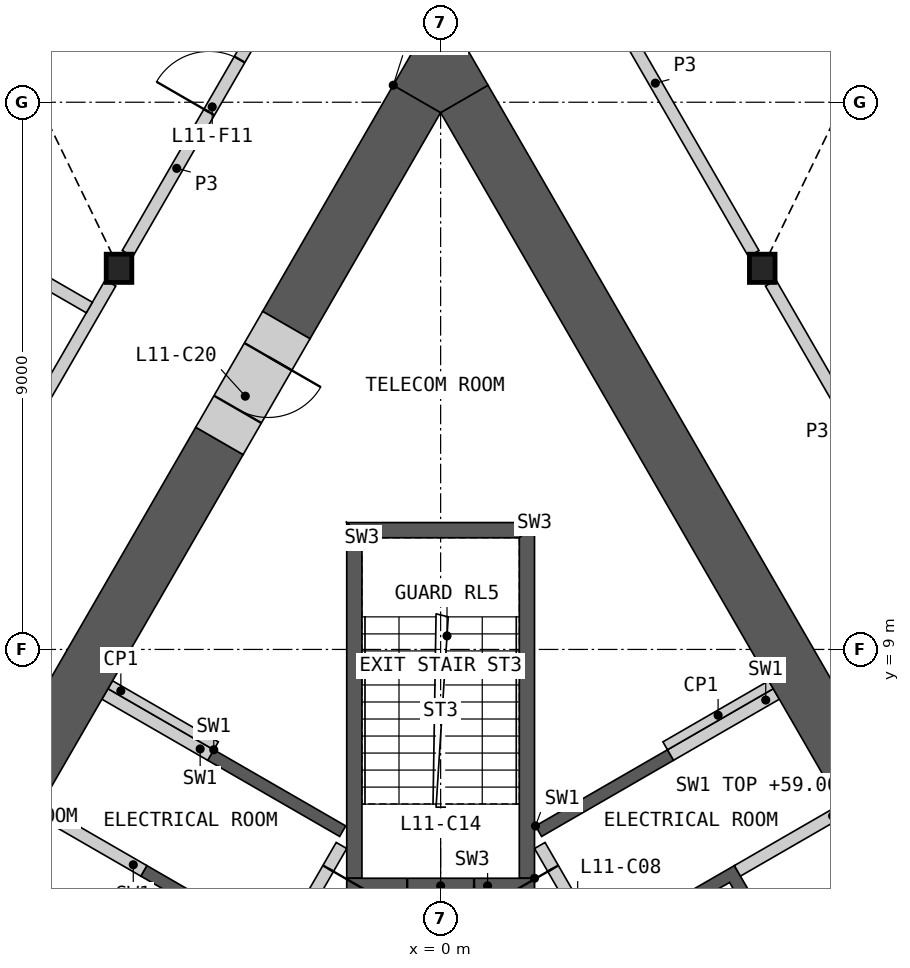
"""IFC4 building model, lengths in metres.
Left out: names, types, materials, properties, quantities, classifications, styles, units other than length and angle.
Written with IfcOpenShell. Run it as: python <this file> out.ifc"""

import sys

from ifc_helpers import new_model, si_unit, direction, frame, frame_2d, origin, origin_2d, place, context, subcontext, project, spatial, polyline, rectangle, i_section, outline, extrude, element, fill, save


model = new_model("IFC4")
c1 = context("Model", 3, precision=1e-05, world=origin(), true_north=direction((0.0, 1.0)))
c2 = subcontext(c1, "Body", "Model", "MODEL_VIEW")
j1 = project(units=[si_unit("LENGTHUNIT", "METRE"), si_unit("PLANEANGLEUNIT", "RADIAN")], contexts=[c1])
p1 = place(None, origin())
s1 = spatial("IfcSite", under=j1, at=p1, CompositionType="ELEMENT")
p2 = place(p1, origin())
s2 = spatial("IfcBuilding", under=s1, at=p2, CompositionType="ELEMENT")
p3 = place(p2, frame((0.0, 0.0, 55.2)))
s3 = spatial("IfcBuildingStorey", under=s2, at=p3, CompositionType="ELEMENT", Elevation=55.2)
for number, where, z_axis, x_axis in (
    (1, (-5.289, 15.269, 0.0), (0.0, 0.0, 1.0), (1.0, 0.0, 0.0)),
    (2, (5.289, 15.269, 0.0), (0.0, 0.0, 1.0), (1.0, 0.0, 0.0)),
):
    element("IfcColumn", number, at=place(p3, frame(where, z_axis=z_axis, x_axis=x_axis)), inside=s3, PredefinedType="COLUMN", context=c2, shape_type="SweptSolid", body=[
        extrude(i_section(OverallWidth=0.421, OverallDepth=0.465, WebThickness=0.045, FlangeThickness=0.072, at=origin_2d()), origin(), (0.0, 0.0, 1.0), 4.2),
    ])
p4 = place(p3, origin())
e3 = element("IfcWall", 3, at=p4, inside=s3, PredefinedType="SHEAR", context=c2, shape_type="SweptSolid", body=[
    extrude(outline(polyline([(1.561, 6.097), (3.731, 7.35), (3.831, 7.177), (1.66, 5.924), (1.561, 6.097)])), origin(), (0.0, 0.0, 1.0), 3.8),
])
p5 = place(p3, origin())
e4 = element("IfcWall", 4, at=p5, inside=s3, PredefinedType="SHEAR", context=c2, shape_type="SweptSolid", body=[
    extrude(outline(polyline([(2.66, 4.192), (4.831, 5.445), (8.231, -0.444), (6.061, -1.697), (5.96, -1.524), (7.952, -0.374), (6.952, 1.358), (4.96, 0.208), (4.861, 0.381), (6.852, 1.531), (5.852, 3.263), (3.861, 2.113), (3.76, 2.287), (5.752, 3.437), (4.752, 5.169), (2.76, 4.019), (2.66, 4.192)])), origin(), (0.0, 0.0, 1.0), 3.8),
])
p6 = place(p3, frame((5.817, -1.476, 0.0), z_axis=(0.0, 0.0, 1.0), x_axis=(-0.500002616675, 0.866023893041, 0.0)))
e5 = element("IfcWall", 5, at=p6, inside=s3, PredefinedType="SOLIDWALL", context=c2, shape_type="SweptSolid", body=[
    extrude(rectangle(XDim=8.373, YDim=0.2, at=frame_2d((4.187, 0.0))), origin(), (0.0, 0.0, 1.0), 3.8),
])
p7 = place(p6, frame((0.337, 0.0, 0.0)))
e6 = element("IfcOpeningElement", 6, at=p7, cuts=e5, PredefinedType="OPENING", context=c2, shape_type="SweptSolid", body=[
    extrude(rectangle(XDim=1.1, YDim=2.1, at=frame_2d((0.55, 1.05))), frame((0.0, 0.11, 0.0), z_axis=(0.0, -1.0, 0.0), x_axis=(1.0, 0.0, 0.0)), (0.0, 0.0, 1.0), 0.22),
])
p8 = place(p6, frame((2.537, 0.0, 0.0)))
e7 = element("IfcOpeningElement", 7, at=p8, cuts=e5, PredefinedType="OPENING", context=c2, shape_type="SweptSolid", body=[
    extrude(rectangle(XDim=1.1, YDim=2.1, at=frame_2d((0.55, 1.05))), frame((0.0, 0.11, 0.0), z_axis=(0.0, -1.0, 0.0), x_axis=(1.0, 0.0, 0.0)), (0.0, 0.0, 1.0), 0.22),
])
p9 = place(p6, frame((4.737, 0.0, 0.0)))
e8 = element("IfcOpeningElement", 8, at=p9, cuts=e5, PredefinedType="OPENING", context=c2, shape_type="SweptSolid", body=[
    extrude(rectangle(XDim=1.1, YDim=2.1, at=frame_2d((0.55, 1.05))), frame((0.0, 0.11, 0.0), z_axis=(0.0, -1.0, 0.0), x_axis=(1.0, 0.0, 0.0)), (0.0, 0.0, 1.0), 0.22),
])
p10 = place(p6, frame((7.037, 0.0, 0.0)))
e9 = element("IfcOpeningElement", 9, at=p10, cuts=e5, PredefinedType="OPENING", context=c2, shape_type="SweptSolid", body=[
    extrude(rectangle(XDim=0.9, YDim=2.1, at=frame_2d((0.45, 1.05))), frame((0.0, 0.11, 0.0), z_axis=(0.0, -1.0, 0.0), x_axis=(1.0, 0.0, 0.0)), (0.0, 0.0, 1.0), 0.22),
])
p11 = place(p3, frame((4.881, 5.358, 0.0), z_axis=(0.0, 0.0, 1.0), x_axis=(0.866035824272, 0.499981950752, 0.0)))
e10 = element("IfcWall", 10, at=p11, inside=s3, PredefinedType="SHEAR", context=c2, shape_type="SweptSolid", body=[
    extrude(rectangle(XDim=2.009, YDim=0.2, at=frame_2d((1.004, 0.0))), origin(), (0.0, 0.0, 1.0), 3.8),
])
p12 = place(p3, frame((3.781, 7.263, 0.0), z_axis=(0.0, 0.0, 1.0), x_axis=(0.865983199114, 0.50007309351, 0.0)))
e11 = element("IfcWall", 11, at=p12, inside=s3, PredefinedType="SHEAR", context=c2, shape_type="SweptSolid", body=[
    extrude(rectangle(XDim=2.009, YDim=0.2, at=frame_2d((1.004, 0.0))), origin(), (0.0, 0.0, 1.0), 3.8),
])
p13 = place(p3, origin())
e12 = element("IfcWall", 12, at=p13, inside=s3, PredefinedType="SHEAR", context=c2, shape_type="SweptSolid", body=[
    extrude(outline(polyline([(-2.76, 4.019), (-4.931, 5.272), (-4.831, 5.445), (-2.66, 4.192), (-2.76, 4.019)])), origin(), (0.0, 0.0, 1.0), 3.8),
])
p14 = place(p3, origin())
e13 = element("IfcWall", 13, at=p14, inside=s3, PredefinedType="SHEAR", context=c2, shape_type="SweptSolid", body=[
    extrude(outline(polyline([(-3.731, 7.35), (-1.561, 6.097), (-1.66, 5.924), (-3.831, 7.177), (-3.731, 7.35)])), origin(), (0.0, 0.0, 1.0), 3.8),
])
p15 = place(p3, frame((-1.631, 5.776, 0.0), z_axis=(0.0, 0.0, 1.0), x_axis=(-0.499992876559, -0.866029516466, 0.0)))
e14 = element("IfcWall", 14, at=p15, inside=s3, PredefinedType="SOLIDWALL", context=c2, shape_type="SweptSolid", body=[
    extrude(rectangle(XDim=6.486, YDim=0.2, at=frame_2d((3.243, 0.0))), origin(), (0.0, 0.0, 1.0), 3.8),
])
p16 = place(p15, frame((0.437, 0.0, 0.0)))
e15 = element("IfcOpeningElement", 15, at=p16, cuts=e14, PredefinedType="OPENING", context=c2, shape_type="SweptSolid", body=[
    extrude(rectangle(XDim=0.9, YDim=2.1, at=frame_2d((0.45, 1.05))), frame((0.0, 0.11, 0.0), z_axis=(0.0, -1.0, 0.0), x_axis=(1.0, 0.0, 0.0)), (0.0, 0.0, 1.0), 0.22),
])
p17 = place(p15, frame((2.637, 0.0, 0.0)))
e16 = element("IfcOpeningElement", 16, at=p17, cuts=e14, PredefinedType="OPENING", context=c2, shape_type="SweptSolid", body=[
    extrude(rectangle(XDim=0.9, YDim=2.1, at=frame_2d((0.45, 1.05))), frame((0.0, 0.11, 0.0), z_axis=(0.0, -1.0, 0.0), x_axis=(1.0, 0.0, 0.0)), (0.0, 0.0, 1.0), 0.22),
])
p18 = place(p3, frame((-3.781, 7.263, 0.0), z_axis=(0.0, 0.0, 1.0), x_axis=(-0.865983199114, 0.50007309351, 0.0)))
e17 = element("IfcWall", 17, at=p18, inside=s3, PredefinedType="SHEAR", context=c2, shape_type="SweptSolid", body=[
    extrude(rectangle(XDim=2.009, YDim=0.2, at=frame_2d((1.004, 0.0))), origin(), (0.0, 0.0, 1.0), 3.8),
])
p19 = place(p3, frame((-4.881, 5.358, 0.0), z_axis=(0.0, 0.0, 1.0), x_axis=(-0.866035824272, 0.499981950752, 0.0)))
e18 = element("IfcWall", 18, at=p19, inside=s3, PredefinedType="SHEAR", context=c2, shape_type="SweptSolid", body=[
    extrude(rectangle(XDim=2.009, YDim=0.2, at=frame_2d((1.004, 0.0))), origin(), (0.0, 0.0, 1.0), 3.8),
])
p20 = place(p3, origin())
e19 = element("IfcWall", 19, at=p20, inside=s3, PredefinedType="SHEAR", context=c2, shape_type="SweptSolid", body=[
    extrude(outline(polyline([(1.544, 5.237), (1.544, 11.087), (1.294, 10.837), (1.294, 5.237), (1.544, 5.237)])), origin(), (0.0, 0.0, 1.0), 3.8),
])
p21 = place(p3, origin())
e20 = element("IfcWall", 20, at=p21, inside=s3, PredefinedType="SHEAR", context=c2, shape_type="SweptSolid", body=[
    extrude(outline(polyline([(1.544, 11.087), (-1.544, 11.087), (-1.294, 10.837), (1.294, 10.837), (1.544, 11.087)])), origin(), (0.0, 0.0, 1.0), 3.8),
])
p22 = place(p3, origin())
e21 = element("IfcWall", 21, at=p22, inside=s3, PredefinedType="SHEAR", context=c2, shape_type="SweptSolid", body=[
    extrude(outline(polyline([(-1.294, 10.837), (-1.544, 11.087), (-1.544, 5.237), (-1.294, 5.237), (-1.294, 10.837)])), origin(), (0.0, 0.0, 1.0), 3.8),
])
p23 = place(p3, frame((1.544, 5.112, 0.0), z_axis=(0.0, 0.0, 1.0), x_axis=(-1.0, 0.0, 0.0)))
e22 = element("IfcWall", 22, at=p23, inside=s3, PredefinedType="SHEAR", context=c2, shape_type="SweptSolid", body=[
    extrude(rectangle(XDim=3.088, YDim=0.25, at=frame_2d((1.544, 0.0))), origin(), (0.0, 0.0, 1.0), 3.8),
])
p24 = place(p23, frame((0.994, 0.0, 0.0)))
e23 = element("IfcOpeningElement", 23, at=p24, cuts=e22, PredefinedType="OPENING", context=c2, shape_type="SweptSolid", body=[
    extrude(rectangle(XDim=1.1, YDim=2.1, at=frame_2d((0.55, 1.05))), frame((0.0, 0.135, 0.0), z_axis=(0.0, -1.0, 0.0), x_axis=(1.0, 0.0, 0.0)), (0.0, 0.0, 1.0), 0.27),
])
for number, where, z_axis, x_axis in (
    (24, (3.693, 7.415, 0.0), (0.0, 0.0, 1.0), (0.866, 0.5, 0.0)),
    (25, (-3.693, 7.415, 0.0), (0.0, 0.0, 1.0), (-0.866, 0.5, 0.0)),
):
    element("IfcWall", number, at=place(p3, frame(where, z_axis=z_axis, x_axis=x_axis)), inside=s3, PredefinedType="PARTITIONING", context=c2, shape_type="SweptSolid", body=[
        extrude(rectangle(XDim=2.009, YDim=0.15, at=frame_2d((1.004, 0.0))), origin(), (0.0, 0.0, 1.0), 3.8),
    ])
p25 = place(p3, frame((8.16, 4.596, 0.0), z_axis=(0.0, 0.0, 1.0), x_axis=(-0.500009830349, 0.866019728156, 0.0)))
e26 = element("IfcWall", 26, at=p25, inside=s3, PredefinedType="SHEAR", context=c2, shape_type="SweptSolid", body=[
    extrude(rectangle(XDim=15.541, YDim=0.9, at=frame_2d((7.771, 0.0))), origin(), (0.0, 0.0, 1.0), 3.8),
])
p26 = place(p3, frame((-3.637, 12.43, 0.0), z_axis=(0.0, 0.0, 1.0), x_axis=(-0.500011513458, -0.866018756384, 0.0)))
e27 = element("IfcWall", 27, at=p26, inside=s3, PredefinedType="SHEAR", context=c2, shape_type="SweptSolid", body=[
    extrude(rectangle(XDim=9.066, YDim=0.9, at=frame_2d((4.533, 0.0))), origin(), (0.0, 0.0, 1.0), 3.8),
])
p27 = place(p3, frame((-0.39, 18.055, 0.0), z_axis=(0.0, 0.0, 1.0), x_axis=(-0.500014347272, -0.866017120224, 0.0)))
e28 = element("IfcWall", 28, at=p27, inside=s3, PredefinedType="SHEAR", context=c2, shape_type="SweptSolid", body=[
    extrude(rectangle(XDim=4.296, YDim=0.9, at=frame_2d((2.148, 0.0))), origin(), (0.0, 0.0, 1.0), 3.8),
])
p28 = place(p3, origin())
e29 = element("IfcWall", 29, at=p28, inside=s3, PredefinedType="SHEAR", context=c2, shape_type="SweptSolid", body=[
    extrude(outline(polyline([(-0.779, 18.28), (0.0, 19.63), (0.779, 18.28), (0.0, 17.83), (-0.779, 18.28)])), origin(), (0.0, 0.0, 1.0), 3.8),
])
p29 = place(p3, frame((-2.538, 14.335, 0.0), z_axis=(0.0, 0.0, 1.0), x_axis=(-0.499994660107, -0.866028486751, 0.0)))
e30 = element("IfcWall", 30, at=p29, inside=s3, PredefinedType="SHEAR", context=c2, shape_type="SweptSolid", body=[
    extrude(rectangle(XDim=2.2, YDim=0.9, at=frame_2d((1.1, 0.0))), origin(), (0.0, 0.0, 1.0), 3.8),
])
p30 = place(p29, frame((0.6, 0.0, 0.0)))
e31 = element("IfcOpeningElement", 31, at=p30, cuts=e30, PredefinedType="OPENING", context=c2, shape_type="SweptSolid", body=[
    extrude(rectangle(XDim=1.0, YDim=2.1, at=frame_2d((0.5, 1.05))), frame((0.0, 0.46, 0.0), z_axis=(0.0, -1.0, 0.0), x_axis=(1.0, 0.0, 0.0)), (0.0, 0.0, 1.0), 0.92),
])
p31 = place(p3, frame((5.429, 15.026, 0.0), z_axis=(0.0, 0.0, 1.0), x_axis=(0.50001002959, -0.86601961312, 0.0)))
e32 = element("IfcWall", 32, at=p31, inside=s3, PredefinedType="PARTITIONING", context=c2, shape_type="SweptSolid", body=[
    extrude(rectangle(XDim=10.019, YDim=0.2, at=frame_2d((5.009, 0.0))), origin(), (0.0, 0.0, 1.0), 3.8),
])
p32 = place(p31, frame((4.059, 0.0, 0.0)))
e33 = element("IfcOpeningElement", 33, at=p32, cuts=e32, PredefinedType="OPENING", context=c2, shape_type="SweptSolid", body=[
    extrude(rectangle(XDim=1.8, YDim=2.1, at=frame_2d((0.9, 1.05))), frame((0.0, 0.11, 0.0), z_axis=(0.0, -1.0, 0.0), x_axis=(1.0, 0.0, 0.0)), (0.0, 0.0, 1.0), 0.22),
])
p33 = place(p3, frame((-10.439, 6.35, 0.0), z_axis=(0.0, 0.0, 1.0), x_axis=(0.50001002959, 0.86601961312, 0.0)))
e34 = element("IfcWall", 34, at=p33, inside=s3, PredefinedType="PARTITIONING", context=c2, shape_type="SweptSolid", body=[
    extrude(rectangle(XDim=10.019, YDim=0.2, at=frame_2d((5.009, 0.0))), origin(), (0.0, 0.0, 1.0), 3.8),
])
p34 = place(p33, frame((4.259, 0.0, 0.0)))
e35 = element("IfcOpeningElement", 35, at=p34, cuts=e34, PredefinedType="OPENING", context=c2, shape_type="SweptSolid", body=[
    extrude(rectangle(XDim=1.0, YDim=2.1, at=frame_2d((0.5, 1.05))), frame((0.0, 0.11, 0.0), z_axis=(0.0, -1.0, 0.0), x_axis=(1.0, 0.0, 0.0)), (0.0, 0.0, 1.0), 0.22),
])
p35 = place(p3, frame((1.913, 21.116, 0.0), z_axis=(0.0, 0.0, 1.0), x_axis=(0.500001069878, -0.866024786089, 0.0)))
e36 = element("IfcWall", 36, at=p35, inside=s3, PredefinedType="PARTITIONING", context=c2, shape_type="SweptSolid", body=[
    extrude(rectangle(XDim=6.473, YDim=0.2, at=frame_2d((3.236, 0.0))), origin(), (0.0, 0.0, 1.0), 3.8),
])
p36 = place(p3, frame((-5.149, 15.511, 0.0), z_axis=(0.0, 0.0, 1.0), x_axis=(0.500001069878, 0.866024786089, 0.0)))
e37 = element("IfcWall", 37, at=p36, inside=s3, PredefinedType="PARTITIONING", context=c2, shape_type="SweptSolid", body=[
    extrude(rectangle(XDim=6.473, YDim=0.2, at=frame_2d((3.236, 0.0))), origin(), (0.0, 0.0, 1.0), 3.8),
])
p37 = place(p36, frame((2.686, 0.0, 0.0)))
e38 = element("IfcOpeningElement", 38, at=p37, cuts=e37, PredefinedType="OPENING", context=c2, shape_type="SweptSolid", body=[
    extrude(rectangle(XDim=1.0, YDim=2.1, at=frame_2d((0.5, 1.05))), frame((0.0, 0.11, 0.0), z_axis=(0.0, -1.0, 0.0), x_axis=(1.0, 0.0, 0.0)), (0.0, 0.0, 1.0), 0.22),
])
p38 = place(p3, frame((-16.981, 21.092, 0.0), z_axis=(0.0, 0.0, 1.0), x_axis=(0.866026884493, -0.499997435328, 0.0)))
e39 = element("IfcWall", 39, at=p38, inside=s3, PredefinedType="PARTITIONING", context=c2, shape_type="SweptSolid", body=[
    extrude(rectangle(XDim=12.937, YDim=0.2, at=frame_2d((6.469, 0.0))), origin(), (0.0, 0.0, 1.0), 2.885),
])
p39 = place(p10, origin())
e40 = element("IfcDoor", 40, at=p39, inside=s3, OperationType="SINGLE_SWING_RIGHT", PredefinedType="DOOR", context=c2, shape_type="SweptSolid", body=[
    extrude(rectangle(XDim=0.9, YDim=2.1, at=frame_2d((0.45, 1.05))), frame((0.0, 0.025, 0.0), z_axis=(0.0, -1.0, 0.0), x_axis=(1.0, 0.0, 0.0)), (0.0, 0.0, 1.0), 0.05),
])
fill(e9, e40)
p40 = place(p16, origin())
e41 = element("IfcDoor", 41, at=p40, inside=s3, OperationType="SINGLE_SWING_LEFT", PredefinedType="DOOR", context=c2, shape_type="SweptSolid", body=[
    extrude(rectangle(XDim=0.9, YDim=2.1, at=frame_2d((0.45, 1.05))), frame((0.0, 0.025, 0.0), z_axis=(0.0, -1.0, 0.0), x_axis=(1.0, 0.0, 0.0)), (0.0, 0.0, 1.0), 0.05),
])
fill(e15, e41)
p41 = place(p24, origin())
e42 = element("IfcDoor", 42, at=p41, inside=s3, OperationType="SINGLE_SWING_LEFT", PredefinedType="DOOR", context=c2, shape_type="SweptSolid", body=[
    extrude(rectangle(XDim=1.1, YDim=2.1, at=frame_2d((0.55, 1.05))), frame((0.0, 0.025, 0.0), z_axis=(0.0, -1.0, 0.0), x_axis=(1.0, 0.0, 0.0)), (0.0, 0.0, 1.0), 0.05),
])
fill(e23, e42)
p42 = place(p30, origin())
e43 = element("IfcDoor", 43, at=p42, inside=s3, OperationType="SINGLE_SWING_LEFT", PredefinedType="DOOR", context=c2, shape_type="SweptSolid", body=[
    extrude(rectangle(XDim=1.0, YDim=2.1, at=frame_2d((0.5, 1.05))), frame((0.0, 0.205, 0.0), z_axis=(0.0, -1.0, 0.0), x_axis=(1.0, 0.0, 0.0)), (0.0, 0.0, 1.0), 0.05),
])
fill(e31, e43)
p43 = place(p37, origin())
e44 = element("IfcDoor", 44, at=p43, inside=s3, OperationType="SINGLE_SWING_LEFT", PredefinedType="DOOR", context=c2, shape_type="SweptSolid", body=[
    extrude(rectangle(XDim=1.0, YDim=2.1, at=frame_2d((0.5, 1.05))), frame((0.0, 0.025, 0.0), z_axis=(0.0, -1.0, 0.0), x_axis=(1.0, 0.0, 0.0)), (0.0, 0.0, 1.0), 0.05),
])
fill(e38, e44)
save(model, sys.argv[1])
